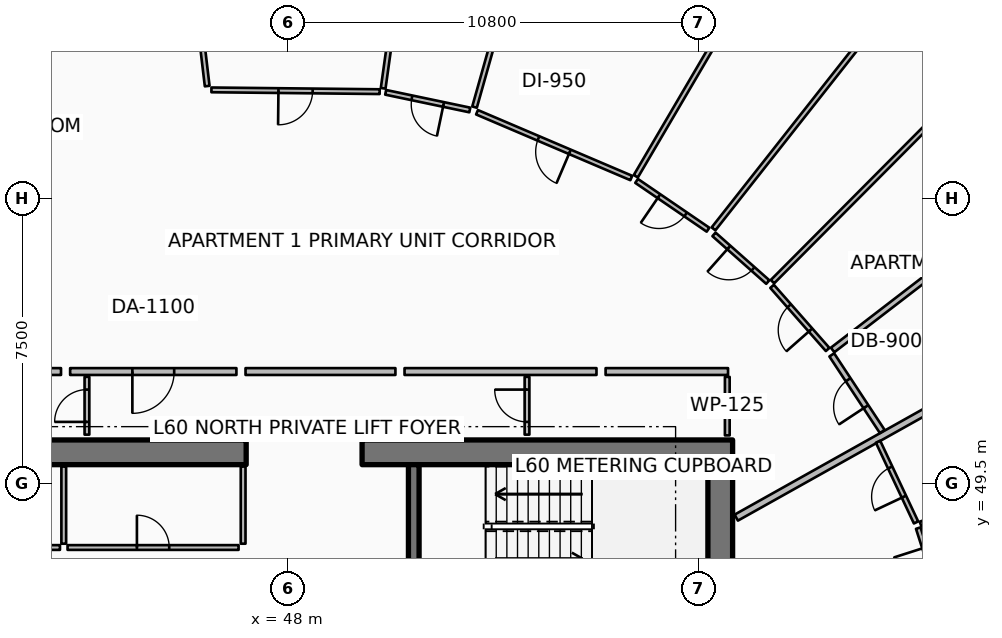
"""IFC4 building model, lengths in metres.
Left out: names, types, materials, properties, quantities, classifications, styles, units other than length and angle.
Written with IfcOpenShell. Run it as: python <this file> out.ifc"""

import sys

from ifc_helpers import new_model, si_unit, direction, frame, frame_2d, origin, place, context, subcontext, project, spatial, rectangle, extrude, element, fill, save


model = new_model("IFC4")
c1 = context("Model", 3, precision=1e-05, world=origin(), true_north=direction((0.0, 1.0)))
c2 = subcontext(c1, "Body", "Model", "MODEL_VIEW")
j1 = project(units=[si_unit("LENGTHUNIT", "METRE"), si_unit("PLANEANGLEUNIT", "RADIAN")], contexts=[c1])
p1 = place(None, origin())
s1 = spatial("IfcSite", under=j1, at=p1, CompositionType="ELEMENT")
p2 = place(p1, origin())
s2 = spatial("IfcBuilding", under=s1, at=p2, CompositionType="ELEMENT")
p3 = place(p2, frame((0.0, 0.0, 240.55)))
s3 = spatial("IfcBuildingStorey", under=s2, at=p3, CompositionType="ELEMENT", Elevation=240.55)
for number, where, z_axis, x_axis in (
    (1, (37.15, 50.325, 0.0), (0.0, 0.0, 1.0), (1.0, 0.0, 0.0)),
    (2, (49.95, 50.325, 0.0), (0.0, 0.0, 1.0), (1.0, 0.0, 0.0)),
):
    element("IfcWall", number, at=place(p3, frame(where, z_axis=z_axis, x_axis=x_axis)), inside=s3, PredefinedType="SHEAR", context=c2, shape_type="SweptSolid", body=[
        extrude(rectangle(XDim=9.75, YDim=0.65, at=frame_2d((4.875, 0.0))), origin(), (0.0, 0.0, 1.0), 3.85),
    ])
p4 = place(p3, frame((59.375, 34.0, 0.0), z_axis=(0.0, 0.0, 1.0), x_axis=(0.0, 1.0, 0.0)))
e3 = element("IfcWall", 3, at=p4, inside=s3, PredefinedType="SHEAR", context=c2, shape_type="SweptSolid", body=[
    extrude(rectangle(XDim=16.0, YDim=0.65, at=frame_2d((8.0, 0.0))), origin(), (0.0, 0.0, 1.0), 3.85),
])
p5 = place(p3, frame((51.31, 46.5, 0.0), z_axis=(0.0, 0.0, 1.0), x_axis=(0.0, 1.0, 0.0)))
e4 = element("IfcWall", 4, at=p5, inside=s3, PredefinedType="SHEAR", context=c2, shape_type="SweptSolid", body=[
    extrude(rectangle(XDim=3.5, YDim=0.28, at=frame_2d((1.75, 0.0))), origin(), (0.0, 0.0, 1.0), 3.85),
])
for number, where, z_axis, x_axis in (
    (5, (46.82, 47.92, 0.0), (0.0, 0.0, 1.0), (0.0, 1.0, 0.0)),
    (6, (42.1, 47.92, 0.0), (0.0, 0.0, 1.0), (0.0, 1.0, 0.0)),
):
    element("IfcWall", number, at=place(p3, frame(where, z_axis=z_axis, x_axis=x_axis)), inside=s3, PredefinedType="PARTITIONING", context=c2, shape_type="SweptSolid", body=[
        extrude(rectangle(XDim=2.03, YDim=0.125, at=frame_2d((1.015, 0.0))), origin(), (0.0, 0.0, 1.0), 3.03),
    ])
p6 = place(p3, frame((37.92, 47.82, 0.0), z_axis=(0.0, 0.0, 1.0), x_axis=(1.0, 0.0, 0.0)))
e7 = element("IfcWall", 7, at=p6, inside=s3, PredefinedType="PARTITIONING", context=c2, shape_type="SweptSolid", body=[
    extrude(rectangle(XDim=4.08, YDim=0.125, at=frame_2d((2.04, 0.0))), origin(), (0.0, 0.0, 1.0), 3.03),
])
p7 = place(p6, frame((1.615, 0.0, 0.0)))
e8 = element("IfcOpeningElement", 8, at=p7, cuts=e7, PredefinedType="OPENING", context=c2, shape_type="SweptSolid", body=[
    extrude(rectangle(XDim=0.85, YDim=2.06, at=frame_2d((0.425, 1.03))), frame((0.0, 0.073, 0.0), z_axis=(0.0, -1.0, 0.0), x_axis=(1.0, 0.0, 0.0)), (0.0, 0.0, 1.0), 0.145),
])
p8 = place(p3, frame((42.2, 47.82, 0.0), z_axis=(0.0, 0.0, 1.0), x_axis=(1.0, 0.0, 0.0)))
e9 = element("IfcWall", 9, at=p8, inside=s3, PredefinedType="PARTITIONING", context=c2, shape_type="SweptSolid", body=[
    extrude(rectangle(XDim=4.5, YDim=0.125, at=frame_2d((2.25, 0.0))), origin(), (0.0, 0.0, 1.0), 3.03),
])
p9 = place(p8, frame((1.825, 0.0, 0.0)))
e10 = element("IfcOpeningElement", 10, at=p9, cuts=e9, PredefinedType="OPENING", context=c2, shape_type="SweptSolid", body=[
    extrude(rectangle(XDim=0.85, YDim=2.06, at=frame_2d((0.425, 1.03))), frame((0.0, 0.073, 0.0), z_axis=(0.0, -1.0, 0.0), x_axis=(1.0, 0.0, 0.0)), (0.0, 0.0, 1.0), 0.145),
])
p10 = place(p3, frame((59.56, 50.77, 0.0), z_axis=(0.0, 0.0, 1.0), x_axis=(0.0, 1.0, 0.0)))
e11 = element("IfcWall", 11, at=p10, inside=s3, PredefinedType="PARTITIONING", context=c2, shape_type="SweptSolid", body=[
    extrude(rectangle(XDim=1.54, YDim=0.125, at=frame_2d((0.77, 0.0))), origin(), (0.0, 0.0, 1.0), 3.03),
])
p11 = place(p3, frame((42.71, 50.79, 0.0), z_axis=(0.0, 0.0, 1.0), x_axis=(0.0, 1.0, 0.0)))
e12 = element("IfcWall", 12, at=p11, inside=s3, PredefinedType="PARTITIONING", context=c2, shape_type="SweptSolid", body=[
    extrude(rectangle(XDim=1.52, YDim=0.125, at=frame_2d((0.76, 0.0))), origin(), (0.0, 0.0, 1.0), 2.957),
])
p12 = place(p11, frame((0.335, 0.0, 0.0)))
e13 = element("IfcOpeningElement", 13, at=p12, cuts=e12, PredefinedType="OPENING", context=c2, shape_type="SweptSolid", body=[
    extrude(rectangle(XDim=0.85, YDim=2.06, at=frame_2d((0.425, 1.03))), frame((0.0, 0.073, 0.0), z_axis=(0.0, -1.0, 0.0), x_axis=(1.0, 0.0, 0.0)), (0.0, 0.0, 1.0), 0.145),
])
p13 = place(p3, frame((54.29, 50.79, 0.0), z_axis=(0.0, 0.0, 1.0), x_axis=(0.0, 1.0, 0.0)))
e14 = element("IfcWall", 14, at=p13, inside=s3, PredefinedType="PARTITIONING", context=c2, shape_type="SweptSolid", body=[
    extrude(rectangle(XDim=1.52, YDim=0.125, at=frame_2d((0.76, 0.0))), origin(), (0.0, 0.0, 1.0), 3.03),
])
p14 = place(p13, frame((0.335, 0.0, 0.0)))
e15 = element("IfcOpeningElement", 15, at=p14, cuts=e14, PredefinedType="OPENING", context=c2, shape_type="SweptSolid", body=[
    extrude(rectangle(XDim=0.85, YDim=2.06, at=frame_2d((0.425, 1.03))), frame((0.0, 0.073, 0.0), z_axis=(0.0, -1.0, 0.0), x_axis=(1.0, 0.0, 0.0)), (0.0, 0.0, 1.0), 0.145),
])
p15 = place(p3, frame((59.796, 48.606, 0.0), z_axis=(0.0, 0.0, 1.0), x_axis=(0.872493213488, 0.488626229767, 0.0)))
e16 = element("IfcWall", 16, at=p15, inside=s3, PredefinedType="PARTITIONING", context=c2, shape_type="SweptSolid", body=[
    extrude(rectangle(XDim=16.91, YDim=0.18, at=frame_2d((8.455, 0.0))), origin(), (0.0, 0.0, 1.0), 2.957),
])
p16 = place(p3, frame((46.643, 52.45, 0.0), z_axis=(0.0, 0.0, 1.0), x_axis=(-1.0, 0.0, 0.0)))
e17 = element("IfcWall", 17, at=p16, inside=s3, PredefinedType="PARTITIONING", context=c2, shape_type="SweptSolid", body=[
    extrude(rectangle(XDim=4.376, YDim=0.18, at=frame_2d((2.188, 0.0))), origin(), (0.0, 0.0, 1.0), 2.957),
])
p17 = place(p16, frame((1.638, 0.0, 0.0)))
e18 = element("IfcOpeningElement", 18, at=p17, cuts=e17, PredefinedType="OPENING", context=c2, shape_type="SweptSolid", body=[
    extrude(rectangle(XDim=1.1, YDim=2.1, at=frame_2d((0.55, 1.05))), frame((0.0, 0.1, 0.0), z_axis=(0.0, -1.0, 0.0), x_axis=(1.0, 0.0, 0.0)), (0.0, 0.0, 1.0), 0.2),
])
p18 = place(p3, frame((59.58, 52.45, 0.0), z_axis=(0.0, 0.0, 1.0), x_axis=(-1.0, 0.0, 0.0)))
e19 = element("IfcWall", 19, at=p18, inside=s3, PredefinedType="PARTITIONING", context=c2, shape_type="SweptSolid", body=[
    extrude(rectangle(XDim=3.222, YDim=0.18, at=frame_2d((1.611, 0.0))), origin(), (0.0, 0.0, 1.0), 2.957),
])
p19 = place(p3, frame((63.639, 50.872, 0.0), z_axis=(0.0, 0.0, 1.0), x_axis=(-0.550539267926, 0.834809268319, 0.0)))
e20 = element("IfcWall", 20, at=p19, inside=s3, PredefinedType="PARTITIONING", context=c2, shape_type="SweptSolid", body=[
    extrude(rectangle(XDim=2.414, YDim=0.15, at=frame_2d((1.207, 0.0))), origin(), (0.0, 0.0, 1.0), 2.957),
])
p20 = place(p19, frame((0.782, 0.0, 0.0)))
e21 = element("IfcOpeningElement", 21, at=p20, cuts=e20, PredefinedType="OPENING", context=c2, shape_type="SweptSolid", body=[
    extrude(rectangle(XDim=0.85, YDim=2.06, at=frame_2d((0.425, 1.03))), frame((0.0, 0.085, 0.0), z_axis=(0.0, -1.0, 0.0), x_axis=(1.0, 0.0, 0.0)), (0.0, 0.0, 1.0), 0.17),
])
p21 = place(p3, frame((62.331, 53.018, 0.0), z_axis=(0.0, 0.0, 1.0), x_axis=(0.792803030826, 0.609477935871, 0.0)))
e22 = element("IfcWall", 22, at=p21, inside=s3, PredefinedType="PARTITIONING", context=c2, shape_type="SweptSolid", body=[
    extrude(rectangle(XDim=4.46, YDim=0.15, at=frame_2d((2.23, 0.0))), origin(), (0.0, 0.0, 1.0), 3.03),
])
p22 = place(p3, frame((60.749, 54.815, 0.0), z_axis=(0.0, 0.0, 1.0), x_axis=(0.705267705861, 0.708941085753, 0.0)))
e23 = element("IfcWall", 23, at=p22, inside=s3, PredefinedType="PARTITIONING", context=c2, shape_type="SweptSolid", body=[
    extrude(rectangle(XDim=11.498, YDim=0.125, at=frame_2d((5.749, 0.0))), origin(), (0.0, 0.0, 1.0), 3.03),
])
p23 = place(p3, frame((62.2, 53.031, 0.0), z_axis=(0.0, 0.0, 1.0), x_axis=(-0.660650282497, 0.750693815238, 0.0)))
e24 = element("IfcWall", 24, at=p23, inside=s3, PredefinedType="PARTITIONING", context=c2, shape_type="SweptSolid", body=[
    extrude(rectangle(XDim=2.212, YDim=0.125, at=frame_2d((1.106, 0.0))), origin(), (0.0, 0.0, 1.0), 3.03),
])
p24 = place(p23, frame((0.681, 0.0, 0.0)))
e25 = element("IfcOpeningElement", 25, at=p24, cuts=e24, PredefinedType="OPENING", context=c2, shape_type="SweptSolid", body=[
    extrude(rectangle(XDim=0.85, YDim=2.06, at=frame_2d((0.425, 1.03))), frame((0.0, 0.073, 0.0), z_axis=(0.0, -1.0, 0.0), x_axis=(1.0, 0.0, 0.0)), (0.0, 0.0, 1.0), 0.145),
])
p25 = place(p3, frame((60.626, 54.805, 0.0), z_axis=(0.0, 0.0, 1.0), x_axis=(-0.748419746602, 0.663225363581, 0.0)))
e26 = element("IfcWall", 26, at=p25, inside=s3, PredefinedType="PARTITIONING", context=c2, shape_type="SweptSolid", body=[
    extrude(rectangle(XDim=1.891, YDim=0.125, at=frame_2d((0.946, 0.0))), origin(), (0.0, 0.0, 1.0), 2.957),
])
p26 = place(p25, frame((0.521, 0.0, 0.0)))
e27 = element("IfcOpeningElement", 27, at=p26, cuts=e26, PredefinedType="OPENING", context=c2, shape_type="SweptSolid", body=[
    extrude(rectangle(XDim=0.85, YDim=2.06, at=frame_2d((0.425, 1.03))), frame((0.0, 0.073, 0.0), z_axis=(0.0, -1.0, 0.0), x_axis=(1.0, 0.0, 0.0)), (0.0, 0.0, 1.0), 0.145),
])
p27 = place(p3, frame((56.118, 52.45, 0.0), z_axis=(0.0, 0.0, 1.0), x_axis=(-1.0, 0.0, 0.0)))
e28 = element("IfcWall", 28, at=p27, inside=s3, PredefinedType="PARTITIONING", context=c2, shape_type="SweptSolid", body=[
    extrude(rectangle(XDim=5.051, YDim=0.18, at=frame_2d((2.525, 0.0))), origin(), (0.0, 0.0, 1.0), 2.957),
])
p28 = place(p3, frame((59.198, 56.204, 0.0), z_axis=(0.0, 0.0, 1.0), x_axis=(0.619101452742, 0.785311015593, 0.0)))
e29 = element("IfcWall", 29, at=p28, inside=s3, PredefinedType="PARTITIONING", context=c2, shape_type="SweptSolid", body=[
    extrude(rectangle(XDim=11.509, YDim=0.125, at=frame_2d((5.754, 0.0))), origin(), (0.0, 0.0, 1.0), 2.957),
])
p29 = place(p3, frame((57.153, 57.588, 0.0), z_axis=(0.0, 0.0, 1.0), x_axis=(0.506323477253, 0.862343630105, 0.0)))
e30 = element("IfcWall", 30, at=p29, inside=s3, PredefinedType="PARTITIONING", context=c2, shape_type="SweptSolid", body=[
    extrude(rectangle(XDim=9.988, YDim=0.125, at=frame_2d((4.994, 0.0))), origin(), (0.0, 0.0, 1.0), 3.03),
])
p30 = place(p3, frame((59.053, 56.182, 0.0), z_axis=(0.0, 0.0, 1.0), x_axis=(-0.825709590898, 0.56409544538, 0.0)))
e31 = element("IfcWall", 31, at=p30, inside=s3, PredefinedType="PARTITIONING", context=c2, shape_type="SweptSolid", body=[
    extrude(rectangle(XDim=2.276, YDim=0.125, at=frame_2d((1.138, 0.0))), origin(), (0.0, 0.0, 1.0), 2.957),
])
p31 = place(p30, frame((0.713, 0.0, 0.0)))
e32 = element("IfcOpeningElement", 32, at=p31, cuts=e31, PredefinedType="OPENING", context=c2, shape_type="SweptSolid", body=[
    extrude(rectangle(XDim=0.85, YDim=2.06, at=frame_2d((0.425, 1.03))), frame((0.0, 0.073, 0.0), z_axis=(0.0, -1.0, 0.0), x_axis=(1.0, 0.0, 0.0)), (0.0, 0.0, 1.0), 0.145),
])
p32 = place(p3, frame((57.034, 57.542, 0.0), z_axis=(0.0, 0.0, 1.0), x_axis=(-0.919921628857, 0.392102278445, 0.0)))
e33 = element("IfcWall", 33, at=p32, inside=s3, PredefinedType="PARTITIONING", context=c2, shape_type="SweptSolid", body=[
    extrude(rectangle(XDim=4.413, YDim=0.125, at=frame_2d((2.206, 0.0))), origin(), (0.0, 0.0, 1.0), 2.957),
])
p33 = place(p32, frame((1.756, 0.0, 0.0)))
e34 = element("IfcOpeningElement", 34, at=p33, cuts=e33, PredefinedType="OPENING", context=c2, shape_type="SweptSolid", body=[
    extrude(rectangle(XDim=0.9, YDim=2.08, at=frame_2d((0.45, 1.04))), frame((0.0, 0.073, 0.0), z_axis=(0.0, -1.0, 0.0), x_axis=(1.0, 0.0, 0.0)), (0.0, 0.0, 1.0), 0.145),
])
p34 = place(p3, frame((50.827, 52.45, 0.0), z_axis=(0.0, 0.0, 1.0), x_axis=(-1.0, 0.0, 0.0)))
e35 = element("IfcWall", 35, at=p34, inside=s3, PredefinedType="PARTITIONING", context=c2, shape_type="SweptSolid", body=[
    extrude(rectangle(XDim=3.944, YDim=0.18, at=frame_2d((1.972, 0.0))), origin(), (0.0, 0.0, 1.0), 2.957),
])
p35 = place(p3, frame((52.909, 59.408, 0.0), z_axis=(0.0, 0.0, 1.0), x_axis=(0.271454299549, 0.962451330331, 0.0)))
e36 = element("IfcWall", 36, at=p35, inside=s3, PredefinedType="PARTITIONING", context=c2, shape_type="SweptSolid", body=[
    extrude(rectangle(XDim=8.897, YDim=0.125, at=frame_2d((4.449, 0.0))), origin(), (0.0, 0.0, 1.0), 2.957),
])
p36 = place(p3, frame((45.874, 59.962, 0.0), z_axis=(0.0, 0.0, 1.0), x_axis=(-0.117533659592, 0.993068899353, 0.0)))
e37 = element("IfcWall", 37, at=p36, inside=s3, PredefinedType="PARTITIONING", context=c2, shape_type="SweptSolid", body=[
    extrude(rectangle(XDim=6.608, YDim=0.125, at=frame_2d((3.304, 0.0))), origin(), (0.0, 0.0, 1.0), 2.957),
])
p37 = place(p3, frame((50.505, 59.903, 0.0), z_axis=(0.0, 0.0, 1.0), x_axis=(0.138550424847, 0.990355380545, 0.0)))
e38 = element("IfcWall", 38, at=p37, inside=s3, PredefinedType="PARTITIONING", context=c2, shape_type="SweptSolid", body=[
    extrude(rectangle(XDim=7.669, YDim=0.125, at=frame_2d((3.834, 0.0))), origin(), (0.0, 0.0, 1.0), 3.03),
])
p38 = place(p3, frame((52.784, 59.332, 0.0), z_axis=(0.0, 0.0, 1.0), x_axis=(-0.978655016217, 0.205509997891, 0.0)))
e39 = element("IfcWall", 39, at=p38, inside=s3, PredefinedType="PARTITIONING", context=c2, shape_type="SweptSolid", body=[
    extrude(rectangle(XDim=2.262, YDim=0.125, at=frame_2d((1.131, 0.0))), origin(), (0.0, 0.0, 1.0), 2.957),
])
p39 = place(p38, frame((0.706, 0.0, 0.0)))
e40 = element("IfcOpeningElement", 40, at=p39, cuts=e39, PredefinedType="OPENING", context=c2, shape_type="SweptSolid", body=[
    extrude(rectangle(XDim=0.85, YDim=2.06, at=frame_2d((0.425, 1.03))), frame((0.0, 0.073, 0.0), z_axis=(0.0, -1.0, 0.0), x_axis=(1.0, 0.0, 0.0)), (0.0, 0.0, 1.0), 0.145),
])
p40 = place(p3, frame((50.412, 59.814, 0.0), z_axis=(0.0, 0.0, 1.0), x_axis=(-0.999943934923, 0.01058900422, 0.0)))
e41 = element("IfcWall", 41, at=p40, inside=s3, PredefinedType="PARTITIONING", context=c2, shape_type="SweptSolid", body=[
    extrude(rectangle(XDim=4.427, YDim=0.125, at=frame_2d((2.213, 0.0))), origin(), (0.0, 0.0, 1.0), 3.03),
])
p41 = place(p40, frame((1.763, 0.0, 0.0)))
e42 = element("IfcOpeningElement", 42, at=p41, cuts=e41, PredefinedType="OPENING", context=c2, shape_type="SweptSolid", body=[
    extrude(rectangle(XDim=0.9, YDim=2.08, at=frame_2d((0.45, 1.04))), frame((0.0, 0.073, 0.0), z_axis=(0.0, -1.0, 0.0), x_axis=(1.0, 0.0, 0.0)), (0.0, 0.0, 1.0), 0.145),
])
p42 = place(p3, frame((42.028, 52.45, 0.0), z_axis=(0.0, 0.0, 1.0), x_axis=(-1.0, 0.0, 0.0)))
e43 = element("IfcWall", 43, at=p42, inside=s3, PredefinedType="PARTITIONING", context=c2, shape_type="SweptSolid", body=[
    extrude(rectangle(XDim=4.758, YDim=0.18, at=frame_2d((2.379, 0.0))), origin(), (0.0, 0.0, 1.0), 2.957),
])
p43 = place(p3, frame((64.645, 48.439, 0.0), z_axis=(0.0, 0.0, 1.0), x_axis=(0.93263897003, 0.360810963778, 0.0)))
e44 = element("IfcWall", 44, at=p43, inside=s3, PredefinedType="PARTITIONING", context=c2, shape_type="SweptSolid", body=[
    extrude(rectangle(XDim=12.043, YDim=0.125, at=frame_2d((6.021, 0.0))), origin(), (0.0, 0.0, 1.0), 3.03),
])
p44 = place(p3, frame((65.175, 46.492, 0.0), z_axis=(0.0, 0.0, 1.0), x_axis=(-0.305358332679, 0.952237516938, 0.0)))
e45 = element("IfcWall", 45, at=p44, inside=s3, PredefinedType="PARTITIONING", context=c2, shape_type="SweptSolid", body=[
    extrude(rectangle(XDim=1.931, YDim=0.125, at=frame_2d((0.965, 0.0))), origin(), (0.0, 0.0, 1.0), 3.03),
])
p45 = place(p44, frame((0.54, 0.0, 0.0)))
e46 = element("IfcOpeningElement", 46, at=p45, cuts=e45, PredefinedType="OPENING", context=c2, shape_type="SweptSolid", body=[
    extrude(rectangle(XDim=0.85, YDim=2.06, at=frame_2d((0.425, 1.03))), frame((0.0, 0.073, 0.0), z_axis=(0.0, -1.0, 0.0), x_axis=(1.0, 0.0, 0.0)), (0.0, 0.0, 1.0), 0.145),
])
p46 = place(p3, frame((64.527, 48.479, 0.0), z_axis=(0.0, 0.0, 1.0), x_axis=(-0.425751972865, 0.904839907167, 0.0)))
e47 = element("IfcWall", 47, at=p46, inside=s3, PredefinedType="PARTITIONING", context=c2, shape_type="SweptSolid", body=[
    extrude(rectangle(XDim=2.348, YDim=0.125, at=frame_2d((1.174, 0.0))), origin(), (0.0, 0.0, 1.0), 2.957),
])
p47 = place(p46, frame((0.749, 0.0, 0.0)))
e48 = element("IfcOpeningElement", 48, at=p47, cuts=e47, PredefinedType="OPENING", context=c2, shape_type="SweptSolid", body=[
    extrude(rectangle(XDim=0.85, YDim=2.06, at=frame_2d((0.425, 1.03))), frame((0.0, 0.073, 0.0), z_axis=(0.0, -1.0, 0.0), x_axis=(1.0, 0.0, 0.0)), (0.0, 0.0, 1.0), 0.145),
])
p48 = place(p9, origin())
e49 = element("IfcDoor", 49, at=p48, inside=s3, OperationType="SINGLE_SWING_LEFT", PredefinedType="DOOR", context=c2, shape_type="SweptSolid", body=[
    extrude(rectangle(XDim=0.85, YDim=2.06, at=frame_2d((0.425, 1.03))), frame((0.0, 0.025, 0.0), z_axis=(0.0, -1.0, 0.0), x_axis=(1.0, 0.0, 0.0)), (0.0, 0.0, 1.0), 0.05),
])
fill(e10, e49)
p49 = place(p12, origin())
e50 = element("IfcDoor", 50, at=p49, inside=s3, OperationType="SINGLE_SWING_LEFT", PredefinedType="DOOR", context=c2, shape_type="SweptSolid", body=[
    extrude(rectangle(XDim=0.85, YDim=2.06, at=frame_2d((0.425, 1.03))), frame((0.0, 0.025, 0.0), z_axis=(0.0, -1.0, 0.0), x_axis=(1.0, 0.0, 0.0)), (0.0, 0.0, 1.0), 0.05),
])
fill(e13, e50)
p50 = place(p14, origin())
e51 = element("IfcDoor", 51, at=p50, inside=s3, OperationType="SINGLE_SWING_RIGHT", PredefinedType="DOOR", context=c2, shape_type="SweptSolid", body=[
    extrude(rectangle(XDim=0.85, YDim=2.06, at=frame_2d((0.425, 1.03))), frame((0.0, 0.025, 0.0), z_axis=(0.0, -1.0, 0.0), x_axis=(1.0, 0.0, 0.0)), (0.0, 0.0, 1.0), 0.05),
])
fill(e15, e51)
p51 = place(p17, origin())
e52 = element("IfcDoor", 52, at=p51, inside=s3, OperationType="SINGLE_SWING_RIGHT", PredefinedType="DOOR", context=c2, shape_type="SweptSolid", body=[
    extrude(rectangle(XDim=1.1, YDim=2.1, at=frame_2d((0.55, 1.05))), frame((0.0, 0.025, 0.0), z_axis=(0.0, -1.0, 0.0), x_axis=(1.0, 0.0, 0.0)), (0.0, 0.0, 1.0), 0.05),
])
fill(e18, e52)
p52 = place(p20, origin())
e53 = element("IfcDoor", 53, at=p52, inside=s3, OperationType="SINGLE_SWING_LEFT", PredefinedType="DOOR", context=c2, shape_type="SweptSolid", body=[
    extrude(rectangle(XDim=0.85, YDim=2.06, at=frame_2d((0.425, 1.03))), frame((0.0, 0.025, 0.0), z_axis=(0.0, -1.0, 0.0), x_axis=(1.0, 0.0, 0.0)), (0.0, 0.0, 1.0), 0.05),
])
fill(e21, e53)
p53 = place(p24, origin())
e54 = element("IfcDoor", 54, at=p53, inside=s3, OperationType="SINGLE_SWING_LEFT", PredefinedType="DOOR", context=c2, shape_type="SweptSolid", body=[
    extrude(rectangle(XDim=0.85, YDim=2.06, at=frame_2d((0.425, 1.03))), frame((0.0, 0.025, 0.0), z_axis=(0.0, -1.0, 0.0), x_axis=(1.0, 0.0, 0.0)), (0.0, 0.0, 1.0), 0.05),
])
fill(e25, e54)
p54 = place(p26, origin())
e55 = element("IfcDoor", 55, at=p54, inside=s3, OperationType="SINGLE_SWING_RIGHT", PredefinedType="DOOR", context=c2, shape_type="SweptSolid", body=[
    extrude(rectangle(XDim=0.85, YDim=2.06, at=frame_2d((0.425, 1.03))), frame((0.0, 0.025, 0.0), z_axis=(0.0, -1.0, 0.0), x_axis=(1.0, 0.0, 0.0)), (0.0, 0.0, 1.0), 0.05),
])
fill(e27, e55)
p55 = place(p31, origin())
e56 = element("IfcDoor", 56, at=p55, inside=s3, OperationType="SINGLE_SWING_RIGHT", PredefinedType="DOOR", context=c2, shape_type="SweptSolid", body=[
    extrude(rectangle(XDim=0.85, YDim=2.06, at=frame_2d((0.425, 1.03))), frame((0.0, 0.025, 0.0), z_axis=(0.0, -1.0, 0.0), x_axis=(1.0, 0.0, 0.0)), (0.0, 0.0, 1.0), 0.05),
])
fill(e32, e56)
p56 = place(p33, origin())
e57 = element("IfcDoor", 57, at=p56, inside=s3, OperationType="SINGLE_SWING_LEFT", PredefinedType="DOOR", context=c2, shape_type="SweptSolid", body=[
    extrude(rectangle(XDim=0.9, YDim=2.08, at=frame_2d((0.45, 1.04))), frame((0.0, 0.025, 0.0), z_axis=(0.0, -1.0, 0.0), x_axis=(1.0, 0.0, 0.0)), (0.0, 0.0, 1.0), 0.05),
])
fill(e34, e57)
p57 = place(p39, origin())
e58 = element("IfcDoor", 58, at=p57, inside=s3, OperationType="SINGLE_SWING_LEFT", PredefinedType="DOOR", context=c2, shape_type="SweptSolid", body=[
    extrude(rectangle(XDim=0.85, YDim=2.06, at=frame_2d((0.425, 1.03))), frame((0.0, 0.025, 0.0), z_axis=(0.0, -1.0, 0.0), x_axis=(1.0, 0.0, 0.0)), (0.0, 0.0, 1.0), 0.05),
])
fill(e40, e58)
p58 = place(p41, origin())
e59 = element("IfcDoor", 59, at=p58, inside=s3, OperationType="SINGLE_SWING_RIGHT", PredefinedType="DOOR", context=c2, shape_type="SweptSolid", body=[
    extrude(rectangle(XDim=0.9, YDim=2.08, at=frame_2d((0.45, 1.04))), frame((0.0, 0.025, 0.0), z_axis=(0.0, -1.0, 0.0), x_axis=(1.0, 0.0, 0.0)), (0.0, 0.0, 1.0), 0.05),
])
fill(e42, e59)
p59 = place(p47, origin())
e60 = element("IfcDoor", 60, at=p59, inside=s3, OperationType="SINGLE_SWING_LEFT", PredefinedType="DOOR", context=c2, shape_type="SweptSolid", body=[
    extrude(rectangle(XDim=0.85, YDim=2.06, at=frame_2d((0.425, 1.03))), frame((0.0, 0.025, 0.0), z_axis=(0.0, -1.0, 0.0), x_axis=(1.0, 0.0, 0.0)), (0.0, 0.0, 1.0), 0.05),
])
fill(e48, e60)
save(model, sys.argv[1])
